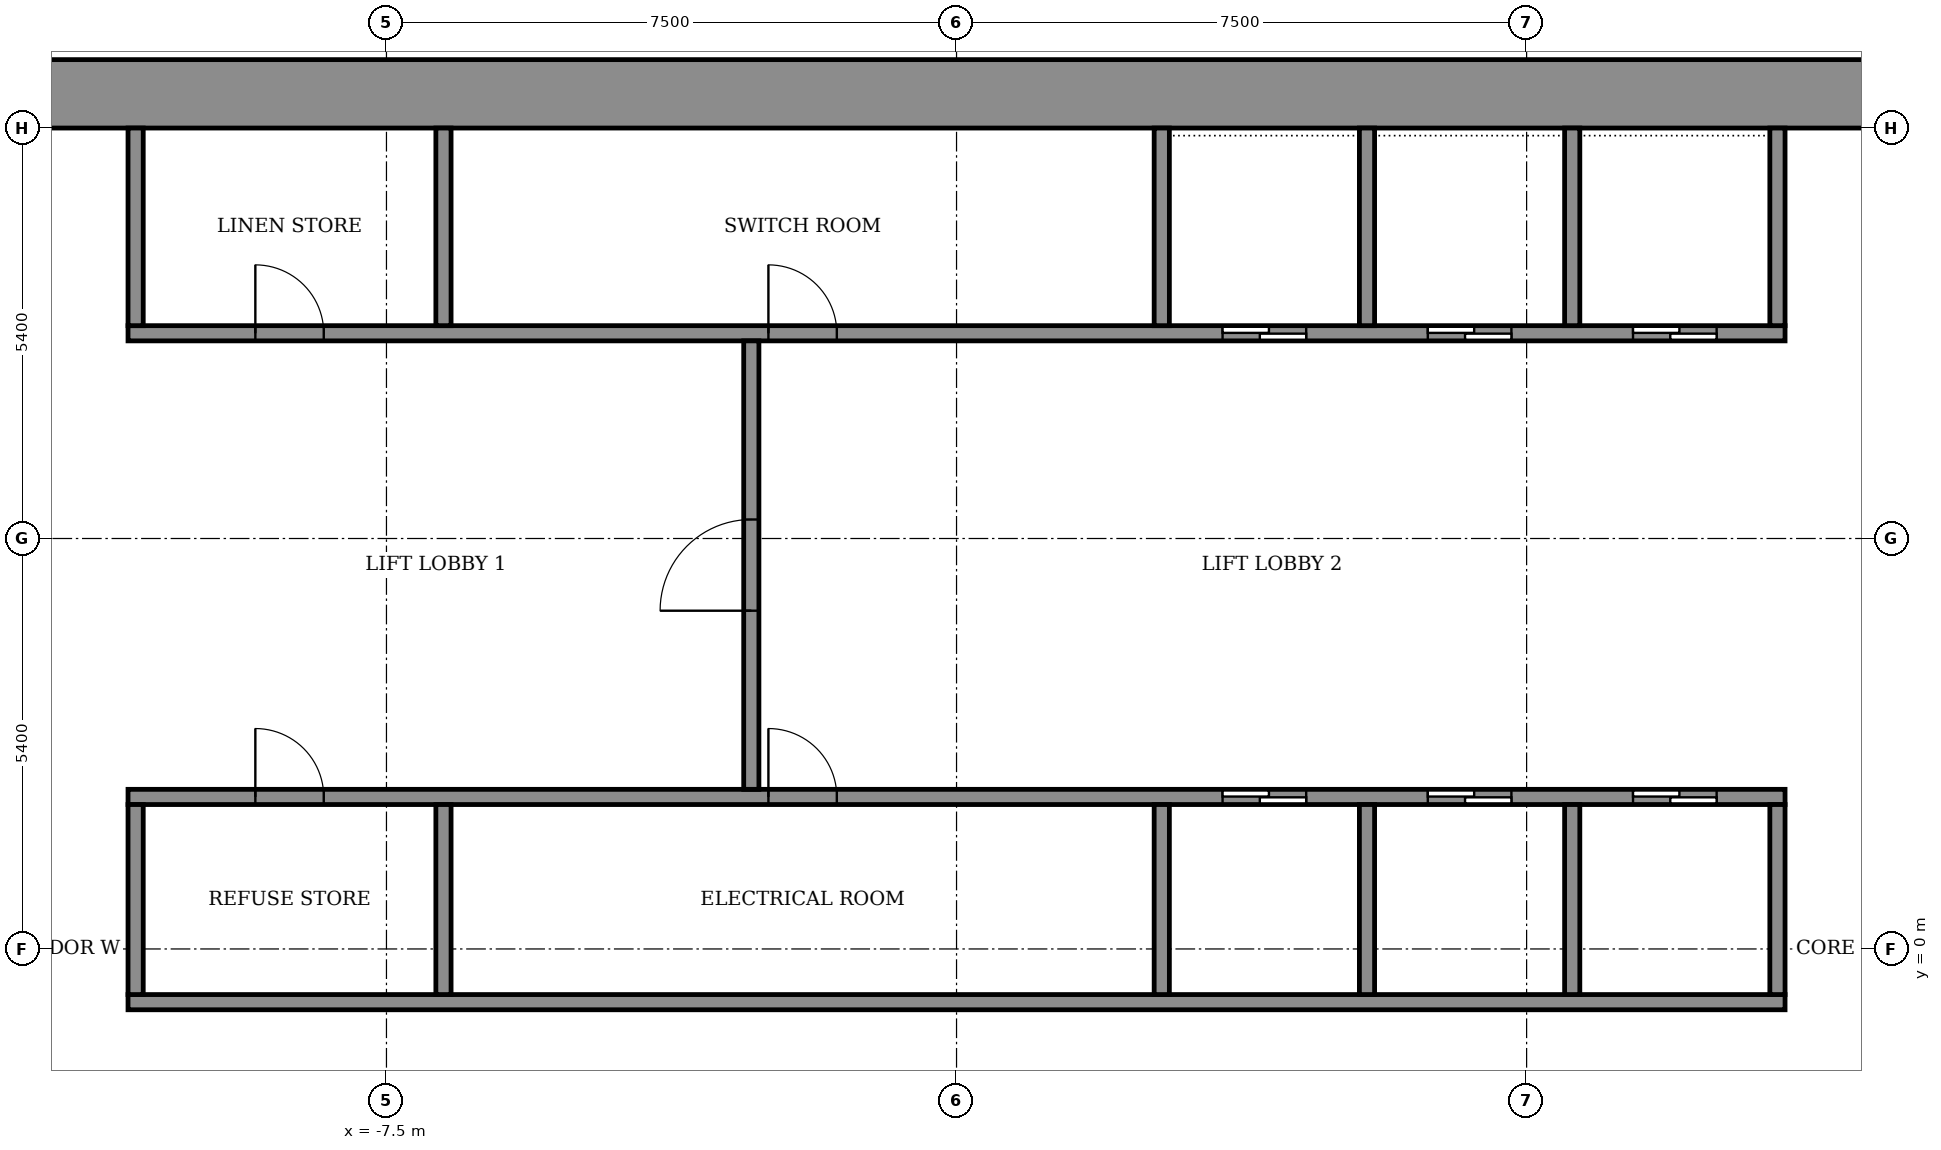
"""IFC4 building model, lengths in metres.
Left out: names, types, materials, properties, quantities, classifications, styles, units other than length and angle.
Written with IfcOpenShell. Run it as: python <this file> out.ifc"""

import sys

from ifc_helpers import new_model, si_unit, direction, frame, frame_2d, origin, place, context, subcontext, project, spatial, rectangle, extrude, element, fill, save


model = new_model("IFC4")
c1 = context("Model", 3, precision=1e-05, world=origin(), true_north=direction((0.0, 1.0)))
c2 = subcontext(c1, "Body", "Model", "MODEL_VIEW")
j1 = project(units=[si_unit("LENGTHUNIT", "METRE"), si_unit("PLANEANGLEUNIT", "RADIAN")], contexts=[c1])
p1 = place(None, origin())
s1 = spatial("IfcSite", under=j1, at=p1, CompositionType="ELEMENT")
p2 = place(p1, origin())
s2 = spatial("IfcBuilding", under=s1, at=p2, CompositionType="ELEMENT")
p3 = place(p2, frame((0.0, 0.0, 144.5)))
s3 = spatial("IfcBuildingStorey", under=s2, at=p3, CompositionType="ELEMENT", Elevation=144.5)
p4 = place(p3, frame((-14.7, 11.25, 0.0), z_axis=(0.0, 0.0, 1.0), x_axis=(1.0, 0.0, 0.0)))
e1 = element("IfcWall", 1, at=p4, inside=s3, PredefinedType="SHEAR", context=c2, shape_type="SweptSolid", body=[
    extrude(rectangle(XDim=29.4, YDim=0.9, at=frame_2d((14.7, 0.0))), origin(), (0.0, 0.0, 1.0), 3.6),
])
p5 = place(p3, frame((-10.9, -0.7, 0.0), z_axis=(0.0, 0.0, 1.0), x_axis=(1.0, 0.0, 0.0)))
e2 = element("IfcWall", 2, at=p5, inside=s3, PredefinedType="SHEAR", context=c2, shape_type="SweptSolid", body=[
    extrude(rectangle(XDim=21.8, YDim=0.2, at=frame_2d((10.9, 0.0))), origin(), (0.0, 0.0, 1.0), 3.05),
])
p6 = place(p3, frame((-10.9, 2.0, 0.0), z_axis=(0.0, 0.0, 1.0), x_axis=(1.0, 0.0, 0.0)))
e3 = element("IfcWall", 3, at=p6, inside=s3, PredefinedType="SHEAR", context=c2, shape_type="SweptSolid", body=[
    extrude(rectangle(XDim=21.8, YDim=0.2, at=frame_2d((10.9, 0.0))), origin(), (0.0, 0.0, 1.0), 3.05),
])
p7 = place(p6, frame((14.4, 0.0, 0.0)))
e4 = element("IfcOpeningElement", 4, at=p7, cuts=e3, PredefinedType="OPENING", context=c2, shape_type="SweptSolid", body=[
    extrude(rectangle(XDim=1.1, YDim=2.1, at=frame_2d((0.55, 1.05))), frame((0.0, 0.11, 0.0), z_axis=(0.0, -1.0, 0.0), x_axis=(1.0, 0.0, 0.0)), (0.0, 0.0, 1.0), 0.22),
])
p8 = place(p6, frame((17.1, 0.0, 0.0)))
e5 = element("IfcOpeningElement", 5, at=p8, cuts=e3, PredefinedType="OPENING", context=c2, shape_type="SweptSolid", body=[
    extrude(rectangle(XDim=1.1, YDim=2.1, at=frame_2d((0.55, 1.05))), frame((0.0, 0.11, 0.0), z_axis=(0.0, -1.0, 0.0), x_axis=(1.0, 0.0, 0.0)), (0.0, 0.0, 1.0), 0.22),
])
p9 = place(p6, frame((19.8, 0.0, 0.0)))
e6 = element("IfcOpeningElement", 6, at=p9, cuts=e3, PredefinedType="OPENING", context=c2, shape_type="SweptSolid", body=[
    extrude(rectangle(XDim=1.1, YDim=2.1, at=frame_2d((0.55, 1.05))), frame((0.0, 0.11, 0.0), z_axis=(0.0, -1.0, 0.0), x_axis=(1.0, 0.0, 0.0)), (0.0, 0.0, 1.0), 0.22),
])
p10 = place(p6, frame((1.675, 0.0, 0.0)))
e7 = element("IfcOpeningElement", 7, at=p10, cuts=e3, PredefinedType="OPENING", context=c2, shape_type="SweptSolid", body=[
    extrude(rectangle(XDim=0.9, YDim=2.1, at=frame_2d((0.45, 1.05))), frame((0.0, 0.11, 0.0), z_axis=(0.0, -1.0, 0.0), x_axis=(1.0, 0.0, 0.0)), (0.0, 0.0, 1.0), 0.22),
])
p11 = place(p6, frame((8.425, 0.0, 0.0)))
e8 = element("IfcOpeningElement", 8, at=p11, cuts=e3, PredefinedType="OPENING", context=c2, shape_type="SweptSolid", body=[
    extrude(rectangle(XDim=0.9, YDim=2.1, at=frame_2d((0.45, 1.05))), frame((0.0, 0.11, 0.0), z_axis=(0.0, -1.0, 0.0), x_axis=(1.0, 0.0, 0.0)), (0.0, 0.0, 1.0), 0.22),
])
p12 = place(p3, frame((-10.9, 8.1, 0.0), z_axis=(0.0, 0.0, 1.0), x_axis=(1.0, 0.0, 0.0)))
e9 = element("IfcWall", 9, at=p12, inside=s3, PredefinedType="SHEAR", context=c2, shape_type="SweptSolid", body=[
    extrude(rectangle(XDim=21.8, YDim=0.2, at=frame_2d((10.9, 0.0))), origin(), (0.0, 0.0, 1.0), 3.05),
])
p13 = place(p12, frame((14.4, 0.0, 0.0)))
e10 = element("IfcOpeningElement", 10, at=p13, cuts=e9, PredefinedType="OPENING", context=c2, shape_type="SweptSolid", body=[
    extrude(rectangle(XDim=1.1, YDim=2.1, at=frame_2d((0.55, 1.05))), frame((0.0, 0.11, 0.0), z_axis=(0.0, -1.0, 0.0), x_axis=(1.0, 0.0, 0.0)), (0.0, 0.0, 1.0), 0.22),
])
p14 = place(p12, frame((17.1, 0.0, 0.0)))
e11 = element("IfcOpeningElement", 11, at=p14, cuts=e9, PredefinedType="OPENING", context=c2, shape_type="SweptSolid", body=[
    extrude(rectangle(XDim=1.1, YDim=2.1, at=frame_2d((0.55, 1.05))), frame((0.0, 0.11, 0.0), z_axis=(0.0, -1.0, 0.0), x_axis=(1.0, 0.0, 0.0)), (0.0, 0.0, 1.0), 0.22),
])
p15 = place(p12, frame((19.8, 0.0, 0.0)))
e12 = element("IfcOpeningElement", 12, at=p15, cuts=e9, PredefinedType="OPENING", context=c2, shape_type="SweptSolid", body=[
    extrude(rectangle(XDim=1.1, YDim=2.1, at=frame_2d((0.55, 1.05))), frame((0.0, 0.11, 0.0), z_axis=(0.0, -1.0, 0.0), x_axis=(1.0, 0.0, 0.0)), (0.0, 0.0, 1.0), 0.22),
])
p16 = place(p12, frame((1.675, 0.0, 0.0)))
e13 = element("IfcOpeningElement", 13, at=p16, cuts=e9, PredefinedType="OPENING", context=c2, shape_type="SweptSolid", body=[
    extrude(rectangle(XDim=0.9, YDim=2.1, at=frame_2d((0.45, 1.05))), frame((0.0, 0.11, 0.0), z_axis=(0.0, -1.0, 0.0), x_axis=(1.0, 0.0, 0.0)), (0.0, 0.0, 1.0), 0.22),
])
p17 = place(p12, frame((8.425, 0.0, 0.0)))
e14 = element("IfcOpeningElement", 14, at=p17, cuts=e9, PredefinedType="OPENING", context=c2, shape_type="SweptSolid", body=[
    extrude(rectangle(XDim=0.9, YDim=2.1, at=frame_2d((0.45, 1.05))), frame((0.0, 0.11, 0.0), z_axis=(0.0, -1.0, 0.0), x_axis=(1.0, 0.0, 0.0)), (0.0, 0.0, 1.0), 0.22),
])
for number, where, z_axis, x_axis in (
    (15, (-10.8, -0.6, 0.0), (0.0, 0.0, 1.0), (0.0, 1.0, 0.0)),
    (16, (-6.75, -0.6, 0.0), (0.0, 0.0, 1.0), (0.0, 1.0, 0.0)),
):
    element("IfcWall", number, at=place(p3, frame(where, z_axis=z_axis, x_axis=x_axis)), inside=s3, PredefinedType="STANDARD", context=c2, shape_type="SweptSolid", body=[
        extrude(rectangle(XDim=2.5, YDim=0.2, at=frame_2d((1.25, 0.0))), origin(), (0.0, 0.0, 1.0), 3.05),
    ])
for number, where, z_axis, x_axis in (
    (17, (2.7, -0.6, 0.0), (0.0, 0.0, 1.0), (0.0, 1.0, 0.0)),
    (18, (5.4, -0.6, 0.0), (0.0, 0.0, 1.0), (0.0, 1.0, 0.0)),
    (19, (8.1, -0.6, 0.0), (0.0, 0.0, 1.0), (0.0, 1.0, 0.0)),
    (20, (10.8, -0.6, 0.0), (0.0, 0.0, 1.0), (0.0, 1.0, 0.0)),
):
    element("IfcWall", number, at=place(p3, frame(where, z_axis=z_axis, x_axis=x_axis)), inside=s3, PredefinedType="SHEAR", context=c2, shape_type="SweptSolid", body=[
        extrude(rectangle(XDim=2.5, YDim=0.2, at=frame_2d((1.25, 0.0))), origin(), (0.0, 0.0, 1.0), 3.05),
    ])
for number, where, z_axis, x_axis in (
    (21, (-10.8, 8.2, 0.0), (0.0, 0.0, 1.0), (0.0, 1.0, 0.0)),
    (22, (-6.75, 8.2, 0.0), (0.0, 0.0, 1.0), (0.0, 1.0, 0.0)),
):
    element("IfcWall", number, at=place(p3, frame(where, z_axis=z_axis, x_axis=x_axis)), inside=s3, PredefinedType="STANDARD", context=c2, shape_type="SweptSolid", body=[
        extrude(rectangle(XDim=2.6, YDim=0.2, at=frame_2d((1.3, 0.0))), origin(), (0.0, 0.0, 1.0), 3.05),
    ])
for number, where, z_axis, x_axis in (
    (23, (2.7, 8.2, 0.0), (0.0, 0.0, 1.0), (0.0, 1.0, 0.0)),
    (24, (5.4, 8.2, 0.0), (0.0, 0.0, 1.0), (0.0, 1.0, 0.0)),
    (25, (8.1, 8.2, 0.0), (0.0, 0.0, 1.0), (0.0, 1.0, 0.0)),
    (26, (10.8, 8.2, 0.0), (0.0, 0.0, 1.0), (0.0, 1.0, 0.0)),
):
    element("IfcWall", number, at=place(p3, frame(where, z_axis=z_axis, x_axis=x_axis)), inside=s3, PredefinedType="SHEAR", context=c2, shape_type="SweptSolid", body=[
        extrude(rectangle(XDim=2.6, YDim=0.2, at=frame_2d((1.3, 0.0))), origin(), (0.0, 0.0, 1.0), 3.05),
    ])
p18 = place(p3, frame((-2.7, 2.1, 0.0), z_axis=(0.0, 0.0, 1.0), x_axis=(0.0, 1.0, 0.0)))
e27 = element("IfcWall", 27, at=p18, inside=s3, PredefinedType="STANDARD", context=c2, shape_type="SweptSolid", body=[
    extrude(rectangle(XDim=5.9, YDim=0.2, at=frame_2d((2.95, 0.0))), origin(), (0.0, 0.0, 1.0), 3.05),
])
p19 = place(p18, frame((2.35, 0.0, 0.0)))
e28 = element("IfcOpeningElement", 28, at=p19, cuts=e27, PredefinedType="OPENING", context=c2, shape_type="SweptSolid", body=[
    extrude(rectangle(XDim=1.2, YDim=2.1, at=frame_2d((0.6, 1.05))), frame((0.0, 0.11, 0.0), z_axis=(0.0, -1.0, 0.0), x_axis=(1.0, 0.0, 0.0)), (0.0, 0.0, 1.0), 0.22),
])
p20 = place(p7, origin())
e29 = element("IfcDoor", 29, at=p20, inside=s3, OperationType="SLIDING_TO_LEFT", PredefinedType="DOOR", context=c2, shape_type="SweptSolid", body=[
    extrude(rectangle(XDim=1.1, YDim=2.1, at=frame_2d((0.55, 1.05))), frame((0.0, 0.025, 0.0), z_axis=(0.0, -1.0, 0.0), x_axis=(1.0, 0.0, 0.0)), (0.0, 0.0, 1.0), 0.05),
])
fill(e4, e29)
p21 = place(p8, origin())
e30 = element("IfcDoor", 30, at=p21, inside=s3, OperationType="SLIDING_TO_LEFT", PredefinedType="DOOR", context=c2, shape_type="SweptSolid", body=[
    extrude(rectangle(XDim=1.1, YDim=2.1, at=frame_2d((0.55, 1.05))), frame((0.0, 0.025, 0.0), z_axis=(0.0, -1.0, 0.0), x_axis=(1.0, 0.0, 0.0)), (0.0, 0.0, 1.0), 0.05),
])
fill(e5, e30)
p22 = place(p9, origin())
e31 = element("IfcDoor", 31, at=p22, inside=s3, OperationType="SLIDING_TO_LEFT", PredefinedType="DOOR", context=c2, shape_type="SweptSolid", body=[
    extrude(rectangle(XDim=1.1, YDim=2.1, at=frame_2d((0.55, 1.05))), frame((0.0, 0.025, 0.0), z_axis=(0.0, -1.0, 0.0), x_axis=(1.0, 0.0, 0.0)), (0.0, 0.0, 1.0), 0.05),
])
fill(e6, e31)
p23 = place(p13, origin())
e32 = element("IfcDoor", 32, at=p23, inside=s3, OperationType="SLIDING_TO_LEFT", PredefinedType="DOOR", context=c2, shape_type="SweptSolid", body=[
    extrude(rectangle(XDim=1.1, YDim=2.1, at=frame_2d((0.55, 1.05))), frame((0.0, 0.025, 0.0), z_axis=(0.0, -1.0, 0.0), x_axis=(1.0, 0.0, 0.0)), (0.0, 0.0, 1.0), 0.05),
])
fill(e10, e32)
p24 = place(p14, origin())
e33 = element("IfcDoor", 33, at=p24, inside=s3, OperationType="SLIDING_TO_LEFT", PredefinedType="DOOR", context=c2, shape_type="SweptSolid", body=[
    extrude(rectangle(XDim=1.1, YDim=2.1, at=frame_2d((0.55, 1.05))), frame((0.0, 0.025, 0.0), z_axis=(0.0, -1.0, 0.0), x_axis=(1.0, 0.0, 0.0)), (0.0, 0.0, 1.0), 0.05),
])
fill(e11, e33)
p25 = place(p15, origin())
e34 = element("IfcDoor", 34, at=p25, inside=s3, OperationType="SLIDING_TO_LEFT", PredefinedType="DOOR", context=c2, shape_type="SweptSolid", body=[
    extrude(rectangle(XDim=1.1, YDim=2.1, at=frame_2d((0.55, 1.05))), frame((0.0, 0.025, 0.0), z_axis=(0.0, -1.0, 0.0), x_axis=(1.0, 0.0, 0.0)), (0.0, 0.0, 1.0), 0.05),
])
fill(e12, e34)
p26 = place(p10, origin())
e35 = element("IfcDoor", 35, at=p26, inside=s3, OperationType="SINGLE_SWING_RIGHT", PredefinedType="DOOR", context=c2, shape_type="SweptSolid", body=[
    extrude(rectangle(XDim=0.9, YDim=2.1, at=frame_2d((0.45, 1.05))), frame((0.0, 0.025, 0.0), z_axis=(0.0, -1.0, 0.0), x_axis=(1.0, 0.0, 0.0)), (0.0, 0.0, 1.0), 0.05),
])
fill(e7, e35)
p27 = place(p11, origin())
e36 = element("IfcDoor", 36, at=p27, inside=s3, OperationType="SINGLE_SWING_LEFT", PredefinedType="DOOR", context=c2, shape_type="SweptSolid", body=[
    extrude(rectangle(XDim=0.9, YDim=2.1, at=frame_2d((0.45, 1.05))), frame((0.0, 0.025, 0.0), z_axis=(0.0, -1.0, 0.0), x_axis=(1.0, 0.0, 0.0)), (0.0, 0.0, 1.0), 0.05),
])
fill(e8, e36)
p28 = place(p16, origin())
e37 = element("IfcDoor", 37, at=p28, inside=s3, OperationType="SINGLE_SWING_RIGHT", PredefinedType="DOOR", context=c2, shape_type="SweptSolid", body=[
    extrude(rectangle(XDim=0.9, YDim=2.1, at=frame_2d((0.45, 1.05))), frame((0.0, 0.025, 0.0), z_axis=(0.0, -1.0, 0.0), x_axis=(1.0, 0.0, 0.0)), (0.0, 0.0, 1.0), 0.05),
])
fill(e13, e37)
p29 = place(p17, origin())
e38 = element("IfcDoor", 38, at=p29, inside=s3, OperationType="SINGLE_SWING_LEFT", PredefinedType="DOOR", context=c2, shape_type="SweptSolid", body=[
    extrude(rectangle(XDim=0.9, YDim=2.1, at=frame_2d((0.45, 1.05))), frame((0.0, 0.025, 0.0), z_axis=(0.0, -1.0, 0.0), x_axis=(1.0, 0.0, 0.0)), (0.0, 0.0, 1.0), 0.05),
])
fill(e14, e38)
p30 = place(p19, origin())
e39 = element("IfcDoor", 39, at=p30, inside=s3, OperationType="SINGLE_SWING_LEFT", PredefinedType="DOOR", context=c2, shape_type="SweptSolid", body=[
    extrude(rectangle(XDim=1.2, YDim=2.1, at=frame_2d((0.6, 1.05))), frame((0.0, 0.025, 0.0), z_axis=(0.0, -1.0, 0.0), x_axis=(1.0, 0.0, 0.0)), (0.0, 0.0, 1.0), 0.05),
])
fill(e28, e39)
save(model, sys.argv[1])
